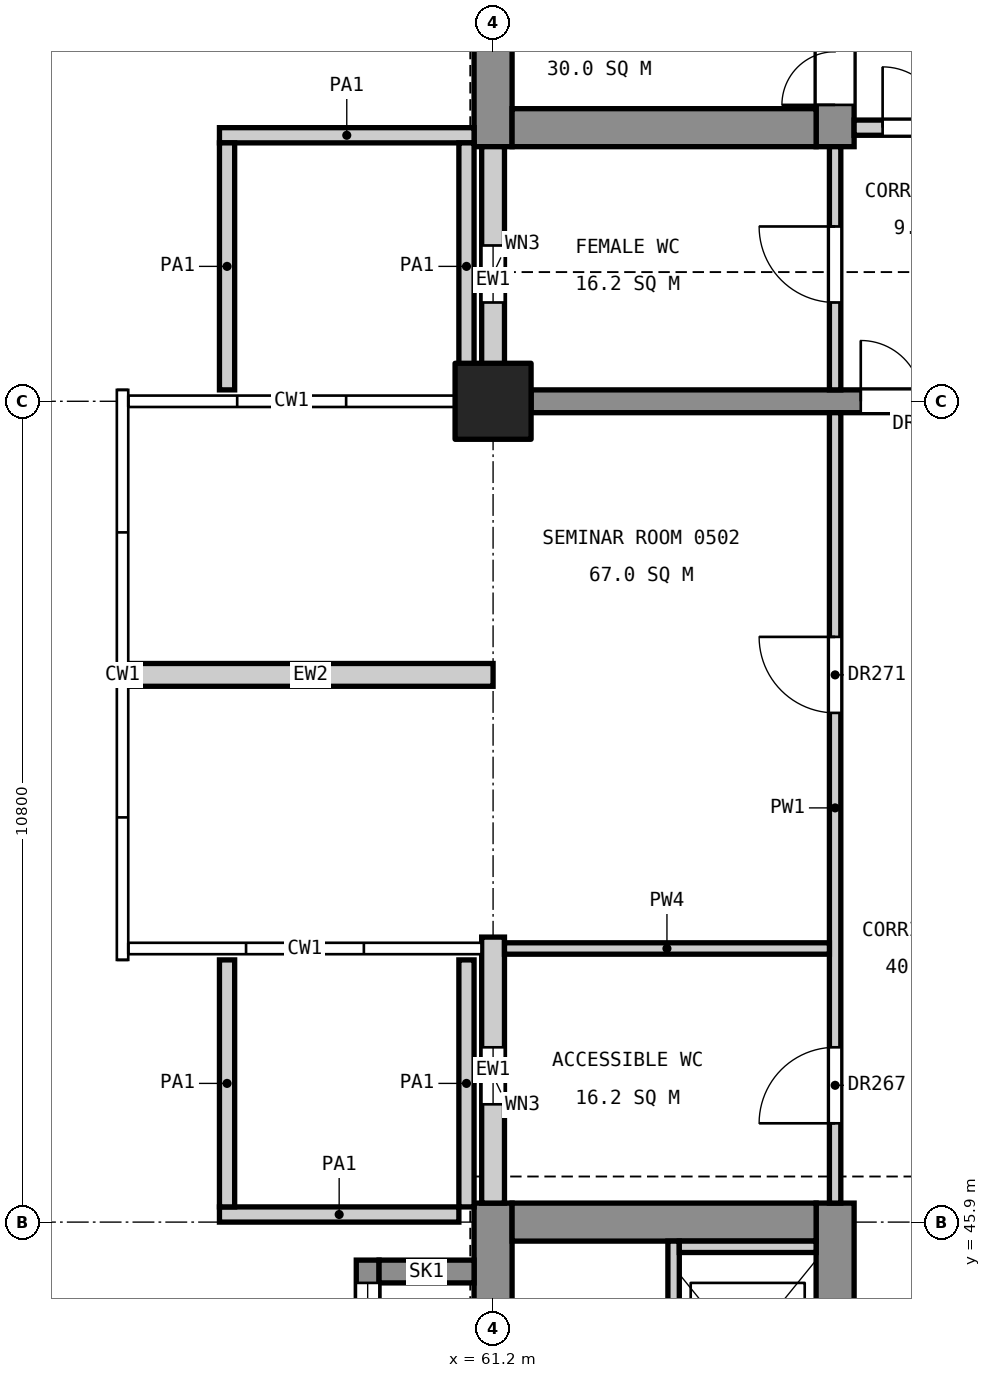
"""IFC4 building model, lengths in metres.
Left out: names, types, materials, properties, quantities, classifications, styles, units other than length and angle.
Written with IfcOpenShell. Run it as: python <this file> out.ifc"""

import sys

from ifc_helpers import new_model, si_unit, direction, frame, frame_2d, origin, origin_2d, place, context, subcontext, project, spatial, rectangle, extrude, element, fill, save


model = new_model("IFC4")
c1 = context("Model", 3, precision=1e-05, world=origin(), true_north=direction((0.0, 1.0)))
c2 = subcontext(c1, "Body", "Model", "MODEL_VIEW")
j1 = project(units=[si_unit("LENGTHUNIT", "METRE"), si_unit("PLANEANGLEUNIT", "RADIAN")], contexts=[c1])
p1 = place(None, origin())
s1 = spatial("IfcSite", under=j1, at=p1, CompositionType="ELEMENT")
p2 = place(p1, origin())
s2 = spatial("IfcBuilding", under=s1, at=p2, CompositionType="ELEMENT")
p3 = place(p2, frame((0.0, 0.0, 27.0)))
s3 = spatial("IfcBuildingStorey", under=s2, at=p3, CompositionType="ELEMENT", Elevation=27.0)
p4 = place(p3, frame((61.2, 56.7, 0.0), z_axis=(0.0, 0.0, 1.0), x_axis=(1.0, 0.0, 0.0)))
e1 = element("IfcColumn", 1, at=p4, inside=s3, PredefinedType="COLUMN", context=c2, shape_type="SweptSolid", body=[
    extrude(rectangle(XDim=1.0, YDim=1.0, at=origin_2d()), origin(), (0.0, 0.0, 1.0), 4.8),
])
p5 = place(p3, frame((61.2, 34.85, 0.0), z_axis=(0.0, 0.0, 1.0), x_axis=(0.0, 1.0, 0.0)))
e2 = element("IfcWall", 2, at=p5, inside=s3, PredefinedType="SHEAR", context=c2, shape_type="SweptSolid", body=[
    extrude(rectangle(XDim=11.3, YDim=0.5, at=frame_2d((5.65, 0.0))), origin(), (0.0, 0.0, 1.0), 4.55),
])
p6 = place(p5, frame((6.16, 0.0, 3.4)))
e3 = element("IfcOpeningElement", 3, at=p6, cuts=e2, PredefinedType="OPENING", context=c2, shape_type="SweptSolid", body=[
    extrude(rectangle(XDim=1.2, YDim=0.9, at=frame_2d((0.6, 0.45))), frame((0.0, 0.26, 0.0), z_axis=(0.0, -1.0, 0.0), x_axis=(1.0, 0.0, 0.0)), (0.0, 0.0, 1.0), 0.52),
])
p7 = place(p3, frame((65.7, 34.85, 0.0), z_axis=(0.0, 0.0, 1.0), x_axis=(0.0, 1.0, 0.0)))
e4 = element("IfcWall", 4, at=p7, inside=s3, PredefinedType="SHEAR", context=c2, shape_type="SweptSolid", body=[
    extrude(rectangle(XDim=11.3, YDim=0.5, at=frame_2d((5.65, 0.0))), origin(), (0.0, 0.0, 1.0), 4.55),
])
p8 = place(p7, frame((0.55, 0.0, 0.0)))
e5 = element("IfcOpeningElement", 5, at=p8, cuts=e4, PredefinedType="OPENING", context=c2, shape_type="SweptSolid", body=[
    extrude(rectangle(XDim=1.4, YDim=2.1, at=frame_2d((0.7, 1.05))), frame((0.0, 0.26, 0.0), z_axis=(0.0, -1.0, 0.0), x_axis=(1.0, 0.0, 0.0)), (0.0, 0.0, 1.0), 0.52),
])
p9 = place(p7, frame((8.8, 0.0, 0.0)))
e6 = element("IfcOpeningElement", 6, at=p9, cuts=e4, PredefinedType="OPENING", context=c2, shape_type="SweptSolid", body=[
    extrude(rectangle(XDim=1.1, YDim=2.1, at=frame_2d((0.55, 1.05))), frame((0.0, 0.26, 0.0), z_axis=(0.0, -1.0, 0.0), x_axis=(1.0, 0.0, 0.0)), (0.0, 0.0, 1.0), 0.52),
])
p10 = place(p3, frame((61.45, 45.9, 0.0), z_axis=(0.0, 0.0, 1.0), x_axis=(1.0, 0.0, 0.0)))
e7 = element("IfcWall", 7, at=p10, inside=s3, PredefinedType="SHEAR", context=c2, shape_type="SweptSolid", body=[
    extrude(rectangle(XDim=4.0, YDim=0.5, at=frame_2d((2.0, 0.0))), origin(), (0.0, 0.0, 1.0), 4.55),
])
p11 = place(p3, frame((61.2, 60.05, 0.0), z_axis=(0.0, 0.0, 1.0), x_axis=(0.0, 1.0, 0.0)))
e8 = element("IfcWall", 8, at=p11, inside=s3, PredefinedType="SHEAR", context=c2, shape_type="SweptSolid", body=[
    extrude(rectangle(XDim=14.9, YDim=0.5, at=frame_2d((7.45, 0.0))), origin(), (0.0, 0.0, 1.0), 4.55),
])
p12 = place(p11, frame((6.16, 0.0, 3.4)))
e9 = element("IfcOpeningElement", 9, at=p12, cuts=e8, PredefinedType="OPENING", context=c2, shape_type="SweptSolid", body=[
    extrude(rectangle(XDim=1.2, YDim=0.9, at=frame_2d((0.6, 0.45))), frame((0.0, 0.26, 0.0), z_axis=(0.0, -1.0, 0.0), x_axis=(1.0, 0.0, 0.0)), (0.0, 0.0, 1.0), 0.52),
])
p13 = place(p3, frame((65.7, 60.05, 0.0), z_axis=(0.0, 0.0, 1.0), x_axis=(0.0, 1.0, 0.0)))
e10 = element("IfcWall", 10, at=p13, inside=s3, PredefinedType="SHEAR", context=c2, shape_type="SweptSolid", body=[
    extrude(rectangle(XDim=14.9, YDim=0.5, at=frame_2d((7.45, 0.0))), origin(), (0.0, 0.0, 1.0), 4.55),
])
p14 = place(p13, frame((0.55, 0.0, 0.0)))
e11 = element("IfcOpeningElement", 11, at=p14, cuts=e10, PredefinedType="OPENING", context=c2, shape_type="SweptSolid", body=[
    extrude(rectangle(XDim=1.4, YDim=2.1, at=frame_2d((0.7, 1.05))), frame((0.0, 0.26, 0.0), z_axis=(0.0, -1.0, 0.0), x_axis=(1.0, 0.0, 0.0)), (0.0, 0.0, 1.0), 0.52),
])
p15 = place(p13, frame((8.85, 0.0, 0.0)))
e12 = element("IfcOpeningElement", 12, at=p15, cuts=e10, PredefinedType="OPENING", context=c2, shape_type="SweptSolid", body=[
    extrude(rectangle(XDim=1.1, YDim=2.1, at=frame_2d((0.55, 1.05))), frame((0.0, 0.26, 0.0), z_axis=(0.0, -1.0, 0.0), x_axis=(1.0, 0.0, 0.0)), (0.0, 0.0, 1.0), 0.52),
])
p16 = place(p13, frame((11.4, 0.0, 0.0)))
e13 = element("IfcOpeningElement", 13, at=p16, cuts=e10, PredefinedType="OPENING", context=c2, shape_type="SweptSolid", body=[
    extrude(rectangle(XDim=1.1, YDim=2.1, at=frame_2d((0.55, 1.05))), frame((0.0, 0.26, 0.0), z_axis=(0.0, -1.0, 0.0), x_axis=(1.0, 0.0, 0.0)), (0.0, 0.0, 1.0), 0.52),
])
p17 = place(p3, frame((61.45, 60.3, 0.0), z_axis=(0.0, 0.0, 1.0), x_axis=(1.0, 0.0, 0.0)))
e14 = element("IfcWall", 14, at=p17, inside=s3, PredefinedType="SHEAR", context=c2, shape_type="SweptSolid", body=[
    extrude(rectangle(XDim=4.0, YDim=0.5, at=frame_2d((2.0, 0.0))), origin(), (0.0, 0.0, 1.0), 4.55),
])
p18 = place(p3, frame((59.55, 43.0, 0.0), z_axis=(0.0, 0.0, 1.0), x_axis=(0.0, 1.0, 0.0)))
e15 = element("IfcWall", 15, at=p18, inside=s3, PredefinedType="SHEAR", context=c2, shape_type="SweptSolid", body=[
    extrude(rectangle(XDim=2.4, YDim=0.3, at=frame_2d((1.2, 0.0))), origin(), (0.0, 0.0, 1.0), 4.8),
])
p19 = place(p18, frame((0.3, 0.0, 3.0)))
e16 = element("IfcOpeningElement", 16, at=p19, cuts=e15, PredefinedType="OPENING", context=c2, shape_type="SweptSolid", body=[
    extrude(rectangle(XDim=1.8, YDim=1.2, at=frame_2d((0.9, 0.6))), frame((0.0, 0.16, 0.0), z_axis=(0.0, -1.0, 0.0), x_axis=(1.0, 0.0, 0.0)), (0.0, 0.0, 1.0), 0.32),
])
p20 = place(p3, frame((60.95, 45.25, 0.0), z_axis=(0.0, 0.0, 1.0), x_axis=(-1.0, 0.0, 0.0)))
e17 = element("IfcWall", 17, at=p20, inside=s3, PredefinedType="SHEAR", context=c2, shape_type="SweptSolid", body=[
    extrude(rectangle(XDim=1.25, YDim=0.3, at=frame_2d((0.625, 0.0))), origin(), (0.0, 0.0, 1.0), 4.8),
])
p21 = place(p3, frame((61.7, 56.7, 0.0), z_axis=(0.0, 0.0, 1.0), x_axis=(1.0, 0.0, 0.0)))
e18 = element("IfcWall", 18, at=p21, inside=s3, PredefinedType="SHEAR", context=c2, shape_type="SweptSolid", body=[
    extrude(rectangle(XDim=6.2, YDim=0.3, at=frame_2d((3.1, 0.0))), origin(), (0.0, 0.0, 1.0), 4.55),
])
p22 = place(p21, frame((4.337, 0.0, 0.0)))
e19 = element("IfcOpeningElement", 19, at=p22, cuts=e18, PredefinedType="OPENING", context=c2, shape_type="SweptSolid", body=[
    extrude(rectangle(XDim=1.6, YDim=2.1, at=frame_2d((0.8, 1.05))), frame((0.0, 0.16, 0.0), z_axis=(0.0, -1.0, 0.0), x_axis=(1.0, 0.0, 0.0)), (0.0, 0.0, 1.0), 0.32),
])
p23 = place(p3, frame((63.575, 43.0, 0.0), z_axis=(0.0, 0.0, 1.0), x_axis=(0.0, 1.0, 0.0)))
e20 = element("IfcWall", 20, at=p23, inside=s3, PredefinedType="SOLIDWALL", context=c2, shape_type="SweptSolid", body=[
    extrude(rectangle(XDim=2.65, YDim=0.15, at=frame_2d((1.325, 0.0))), origin(), (0.0, 0.0, 1.0), 4.8),
])
p24 = place(p3, frame((63.65, 45.575, 0.0), z_axis=(0.0, 0.0, 1.0), x_axis=(1.0, 0.0, 0.0)))
e21 = element("IfcWall", 21, at=p24, inside=s3, PredefinedType="SOLIDWALL", context=c2, shape_type="SweptSolid", body=[
    extrude(rectangle(XDim=1.8, YDim=0.15, at=frame_2d((0.9, 0.0))), origin(), (0.0, 0.0, 1.0), 4.8),
])
p25 = place(p3, frame((60.85, 49.35, 0.0), z_axis=(0.0, 0.0, 1.0), x_axis=(0.0, -1.0, 0.0)))
e22 = element("IfcWall", 22, at=p25, inside=s3, PredefinedType="PARAPET", context=c2, shape_type="SweptSolid", body=[
    extrude(rectangle(XDim=3.25, YDim=0.2, at=frame_2d((1.625, 0.0))), origin(), (0.0, 0.0, 1.0), 1.2),
])
p26 = place(p3, frame((60.75, 46.0, 0.0), z_axis=(0.0, 0.0, 1.0), x_axis=(-1.0, 0.0, 0.0)))
e23 = element("IfcWall", 23, at=p26, inside=s3, PredefinedType="PARAPET", context=c2, shape_type="SweptSolid", body=[
    extrude(rectangle(XDim=3.15, YDim=0.2, at=frame_2d((1.575, 0.0))), origin(), (0.0, 0.0, 1.0), 1.2),
])
p27 = place(p3, frame((57.7, 46.1, 0.0), z_axis=(0.0, 0.0, 1.0), x_axis=(0.0, 1.0, 0.0)))
e24 = element("IfcWall", 24, at=p27, inside=s3, PredefinedType="PARAPET", context=c2, shape_type="SweptSolid", body=[
    extrude(rectangle(XDim=3.25, YDim=0.2, at=frame_2d((1.625, 0.0))), origin(), (0.0, 0.0, 1.0), 1.2),
])
p28 = place(p3, frame((57.6, 60.2, 0.0), z_axis=(0.0, 0.0, 1.0), x_axis=(1.0, 0.0, 0.0)))
e25 = element("IfcWall", 25, at=p28, inside=s3, PredefinedType="PARAPET", context=c2, shape_type="SweptSolid", body=[
    extrude(rectangle(XDim=3.35, YDim=0.2, at=frame_2d((1.675, 0.0))), origin(), (0.0, 0.0, 1.0), 1.2),
])
for number, where, z_axis, x_axis in (
    (26, (60.85, 60.1, 0.0), (0.0, 0.0, 1.0), (0.0, -1.0, 0.0)),
    (27, (57.7, 56.85, 0.0), (0.0, 0.0, 1.0), (0.0, 1.0, 0.0)),
):
    element("IfcWall", number, at=place(p3, frame(where, z_axis=z_axis, x_axis=x_axis)), inside=s3, PredefinedType="PARAPET", context=c2, shape_type="SweptSolid", body=[
        extrude(rectangle(XDim=3.25, YDim=0.2, at=frame_2d((1.625, 0.0))), origin(), (0.0, 0.0, 1.0), 1.2),
    ])
p29 = place(p3, frame((61.2, 46.15, 0.0), z_axis=(0.0, 0.0, 1.0), x_axis=(0.0, 1.0, 0.0)))
e28 = element("IfcWall", 28, at=p29, inside=s3, PredefinedType="STANDARD", context=c2, shape_type="SweptSolid", body=[
    extrude(rectangle(XDim=3.5, YDim=0.3, at=frame_2d((1.75, 0.0))), origin(), (0.0, 0.0, 1.0), 3.65),
])
p30 = place(p29, frame((1.3, 0.0, 0.8)))
e29 = element("IfcOpeningElement", 29, at=p30, cuts=e28, PredefinedType="OPENING", context=c2, shape_type="SweptSolid", body=[
    extrude(rectangle(XDim=0.75, YDim=1.2, at=frame_2d((0.375, 0.6))), frame((0.0, 0.16, 0.0), z_axis=(0.0, -1.0, 0.0), x_axis=(1.0, 0.0, 0.0)), (0.0, 0.0, 1.0), 0.32),
])
p31 = place(p3, frame((61.2, 56.55, 0.0), z_axis=(0.0, 0.0, 1.0), x_axis=(0.0, 1.0, 0.0)))
e30 = element("IfcWall", 30, at=p31, inside=s3, PredefinedType="STANDARD", context=c2, shape_type="SweptSolid", body=[
    extrude(rectangle(XDim=3.5, YDim=0.3, at=frame_2d((1.75, 0.0))), origin(), (0.0, 0.0, 1.0), 3.65),
])
p32 = place(p31, frame((1.45, 0.0, 0.8)))
e31 = element("IfcOpeningElement", 31, at=p32, cuts=e30, PredefinedType="OPENING", context=c2, shape_type="SweptSolid", body=[
    extrude(rectangle(XDim=0.75, YDim=1.2, at=frame_2d((0.375, 0.6))), frame((0.0, 0.16, 0.0), z_axis=(0.0, -1.0, 0.0), x_axis=(1.0, 0.0, 0.0)), (0.0, 0.0, 1.0), 0.32),
])
p33 = place(p3, frame((56.4, 53.1, 0.0), z_axis=(0.0, 0.0, 1.0), x_axis=(1.0, 0.0, 0.0)))
e32 = element("IfcWall", 32, at=p33, inside=s3, PredefinedType="STANDARD", context=c2, shape_type="SweptSolid", body=[
    extrude(rectangle(XDim=4.8, YDim=0.3, at=frame_2d((2.4, 0.0))), origin(), (0.0, 0.0, 1.0), 3.65),
])
p34 = place(p3, frame((65.7, 46.15, 0.0), z_axis=(0.0, 0.0, 1.0), x_axis=(0.0, 1.0, 0.0)))
e33 = element("IfcWall", 33, at=p34, inside=s3, PredefinedType="PARTITIONING", context=c2, shape_type="SweptSolid", body=[
    extrude(rectangle(XDim=10.4, YDim=0.15, at=frame_2d((5.2, 0.0))), origin(), (0.0, 0.0, 1.0), 3.55),
])
p35 = place(p34, frame((1.05, 0.0, 0.0)))
e34 = element("IfcOpeningElement", 34, at=p35, cuts=e33, PredefinedType="OPENING", context=c2, shape_type="SweptSolid", body=[
    extrude(rectangle(XDim=1.0, YDim=2.1, at=frame_2d((0.5, 1.05))), frame((0.0, 0.085, 0.0), z_axis=(0.0, -1.0, 0.0), x_axis=(1.0, 0.0, 0.0)), (0.0, 0.0, 1.0), 0.17),
])
p36 = place(p34, frame((6.45, 0.0, 0.0)))
e35 = element("IfcOpeningElement", 35, at=p36, cuts=e33, PredefinedType="OPENING", context=c2, shape_type="SweptSolid", body=[
    extrude(rectangle(XDim=1.0, YDim=2.1, at=frame_2d((0.5, 1.05))), frame((0.0, 0.085, 0.0), z_axis=(0.0, -1.0, 0.0), x_axis=(1.0, 0.0, 0.0)), (0.0, 0.0, 1.0), 0.17),
])
p37 = place(p3, frame((65.7, 56.85, 0.0), z_axis=(0.0, 0.0, 1.0), x_axis=(0.0, 1.0, 0.0)))
e36 = element("IfcWall", 36, at=p37, inside=s3, PredefinedType="PARTITIONING", context=c2, shape_type="SweptSolid", body=[
    extrude(rectangle(XDim=3.2, YDim=0.15, at=frame_2d((1.6, 0.0))), origin(), (0.0, 0.0, 1.0), 3.55),
])
p38 = place(p37, frame((1.15, 0.0, 0.0)))
e37 = element("IfcOpeningElement", 37, at=p38, cuts=e36, PredefinedType="OPENING", context=c2, shape_type="SweptSolid", body=[
    extrude(rectangle(XDim=1.0, YDim=2.1, at=frame_2d((0.5, 1.05))), frame((0.0, 0.085, 0.0), z_axis=(0.0, -1.0, 0.0), x_axis=(1.0, 0.0, 0.0)), (0.0, 0.0, 1.0), 0.17),
])
p39 = place(p3, frame((61.35, 49.5, 0.0), z_axis=(0.0, 0.0, 1.0), x_axis=(1.0, 0.0, 0.0)))
e38 = element("IfcWall", 38, at=p39, inside=s3, PredefinedType="PARTITIONING", context=c2, shape_type="SweptSolid", body=[
    extrude(rectangle(XDim=4.275, YDim=0.15, at=frame_2d((2.137, 0.0))), origin(), (0.0, 0.0, 1.0), 3.85),
])
p40 = place(p3, frame((65.95, 60.3, 0.0), z_axis=(0.0, 0.0, 1.0), x_axis=(1.0, 0.0, 0.0)))
e39 = element("IfcWall", 39, at=p40, inside=s3, PredefinedType="PARTITIONING", context=c2, shape_type="SweptSolid", body=[
    extrude(rectangle(XDim=2.35, YDim=0.2, at=frame_2d((1.175, 0.0))), origin(), (0.0, 0.0, 1.0), 3.85),
])
p41 = place(p40, frame((0.375, 0.0, 0.0)))
e40 = element("IfcOpeningElement", 40, at=p41, cuts=e39, PredefinedType="OPENING", context=c2, shape_type="SweptSolid", body=[
    extrude(rectangle(XDim=1.6, YDim=2.1, at=frame_2d((0.8, 1.05))), frame((0.0, 0.11, 0.0), z_axis=(0.0, -1.0, 0.0), x_axis=(1.0, 0.0, 0.0)), (0.0, 0.0, 1.0), 0.22),
])
p42 = place(p14, origin())
e41 = element("IfcDoor", 41, at=p42, inside=s3, OperationType="DOUBLE_DOOR_SINGLE_SWING", PredefinedType="DOOR", context=c2, shape_type="SweptSolid", body=[
    extrude(rectangle(XDim=1.4, YDim=2.1, at=frame_2d((0.7, 1.05))), frame((0.0, 0.025, 0.0), z_axis=(0.0, -1.0, 0.0), x_axis=(1.0, 0.0, 0.0)), (0.0, 0.0, 1.0), 0.05),
])
fill(e11, e41)
p43 = place(p30, origin())
e42 = element("IfcWindow", 42, at=p43, inside=s3, PartitioningType="SINGLE_PANEL", PredefinedType="WINDOW", context=c2, shape_type="SweptSolid", body=[
    extrude(rectangle(XDim=0.75, YDim=1.2, at=frame_2d((0.375, 0.6))), frame((0.0, 0.03, 0.0), z_axis=(0.0, -1.0, 0.0), x_axis=(1.0, 0.0, 0.0)), (0.0, 0.0, 1.0), 0.06),
])
fill(e29, e42)
p44 = place(p32, origin())
e43 = element("IfcWindow", 43, at=p44, inside=s3, PartitioningType="SINGLE_PANEL", PredefinedType="WINDOW", context=c2, shape_type="SweptSolid", body=[
    extrude(rectangle(XDim=0.75, YDim=1.2, at=frame_2d((0.375, 0.6))), frame((0.0, 0.03, 0.0), z_axis=(0.0, -1.0, 0.0), x_axis=(1.0, 0.0, 0.0)), (0.0, 0.0, 1.0), 0.06),
])
fill(e31, e43)
p45 = place(p19, origin())
e44 = element("IfcWindow", 44, at=p45, inside=s3, PartitioningType="SINGLE_PANEL", PredefinedType="WINDOW", context=c2, shape_type="SweptSolid", body=[
    extrude(rectangle(XDim=1.8, YDim=1.2, at=frame_2d((0.9, 0.6))), frame((0.0, 0.03, 0.0), z_axis=(0.0, -1.0, 0.0), x_axis=(1.0, 0.0, 0.0)), (0.0, 0.0, 1.0), 0.06),
])
fill(e16, e44)
p46 = place(p35, origin())
e45 = element("IfcDoor", 45, at=p46, inside=s3, OperationType="SINGLE_SWING_LEFT", PredefinedType="DOOR", context=c2, shape_type="SweptSolid", body=[
    extrude(rectangle(XDim=1.0, YDim=2.1, at=frame_2d((0.5, 1.05))), frame((0.0, 0.025, 0.0), z_axis=(0.0, -1.0, 0.0), x_axis=(1.0, 0.0, 0.0)), (0.0, 0.0, 1.0), 0.05),
])
fill(e34, e45)
p47 = place(p38, origin())
e46 = element("IfcDoor", 46, at=p47, inside=s3, OperationType="SINGLE_SWING_RIGHT", PredefinedType="DOOR", context=c2, shape_type="SweptSolid", body=[
    extrude(rectangle(XDim=1.0, YDim=2.1, at=frame_2d((0.5, 1.05))), frame((0.0, 0.025, 0.0), z_axis=(0.0, -1.0, 0.0), x_axis=(1.0, 0.0, 0.0)), (0.0, 0.0, 1.0), 0.05),
])
fill(e37, e46)
p48 = place(p36, origin())
e47 = element("IfcDoor", 47, at=p48, inside=s3, OperationType="SINGLE_SWING_RIGHT", PredefinedType="DOOR", context=c2, shape_type="SweptSolid", body=[
    extrude(rectangle(XDim=1.0, YDim=2.1, at=frame_2d((0.5, 1.05))), frame((0.0, 0.025, 0.0), z_axis=(0.0, -1.0, 0.0), x_axis=(1.0, 0.0, 0.0)), (0.0, 0.0, 1.0), 0.05),
])
fill(e35, e47)
p49 = place(p41, origin())
e48 = element("IfcDoor", 48, at=p49, inside=s3, OperationType="DOUBLE_DOOR_SINGLE_SWING", PredefinedType="DOOR", context=c2, shape_type="SweptSolid", body=[
    extrude(rectangle(XDim=1.6, YDim=2.1, at=frame_2d((0.8, 1.05))), frame((0.0, 0.025, 0.0), z_axis=(0.0, -1.0, 0.0), x_axis=(1.0, 0.0, 0.0)), (0.0, 0.0, 1.0), 0.05),
])
fill(e40, e48)
p50 = place(p22, origin())
e49 = element("IfcDoor", 49, at=p50, inside=s3, OperationType="DOUBLE_DOOR_SINGLE_SWING", PredefinedType="DOOR", context=c2, shape_type="SweptSolid", body=[
    extrude(rectangle(XDim=1.6, YDim=2.1, at=frame_2d((0.8, 1.05))), frame((0.0, 0.025, 0.0), z_axis=(0.0, -1.0, 0.0), x_axis=(1.0, 0.0, 0.0)), (0.0, 0.0, 1.0), 0.05),
])
fill(e19, e49)
save(model, sys.argv[1])
